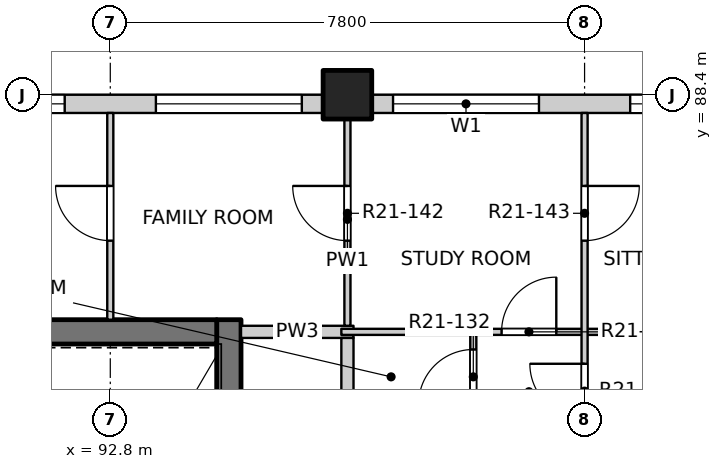
"""IFC4 building model, lengths in metres.
Left out: names, types, materials, properties, quantities, classifications, styles, units other than length and angle.
Written with IfcOpenShell. Run it as: python <this file> out.ifc"""

import sys

from ifc_helpers import new_model, si_unit, direction, frame, frame_2d, origin, origin_2d, place, context, subcontext, project, spatial, rectangle, extrude, element, fill, save


model = new_model("IFC4")
c1 = context("Model", 3, precision=1e-05, world=origin(), true_north=direction((0.0, 1.0)))
c2 = subcontext(c1, "Body", "Model", "MODEL_VIEW")
j1 = project(units=[si_unit("LENGTHUNIT", "METRE"), si_unit("PLANEANGLEUNIT", "RADIAN")], contexts=[c1])
p1 = place(None, origin())
s1 = spatial("IfcSite", under=j1, at=p1, CompositionType="ELEMENT")
p2 = place(p1, origin())
s2 = spatial("IfcBuilding", under=s1, at=p2, CompositionType="ELEMENT")
p3 = place(p2, frame((0.0, 0.0, 214.3)))
s3 = spatial("IfcBuildingStorey", under=s2, at=p3, CompositionType="ELEMENT", Elevation=214.3)
p4 = place(p3, frame((96.7, 88.4, -0.25), z_axis=(0.0, 0.0, 1.0), x_axis=(1.0, 0.0, 0.0)))
e1 = element("IfcColumn", 1, at=p4, inside=s3, PredefinedType="COLUMN", context=c2, shape_type="SweptSolid", body=[
    extrude(rectangle(XDim=0.8, YDim=0.8, at=origin_2d()), origin(), (0.0, 0.0, 1.0), 3.4),
])
p5 = place(p3, frame((94.75, 77.3, -0.25), z_axis=(0.0, 0.0, 1.0), x_axis=(0.0, 1.0, 0.0)))
e2 = element("IfcWall", 2, at=p5, inside=s3, PredefinedType="SOLIDWALL", context=c2, shape_type="SweptSolid", body=[
    extrude(rectangle(XDim=7.4, YDim=0.4, at=frame_2d((3.7, 0.0))), origin(), (0.0, 0.0, 1.0), 3.4),
])
p6 = place(p5, frame((0.3, 0.0, 0.25)))
e3 = element("IfcOpeningElement", 3, at=p6, cuts=e2, PredefinedType="OPENING", context=c2, shape_type="SweptSolid", body=[
    extrude(rectangle(XDim=1.2, YDim=2.1, at=frame_2d((0.6, 1.05))), frame((0.0, 0.21, 0.0), z_axis=(0.0, -1.0, 0.0), x_axis=(1.0, 0.0, 0.0)), (0.0, 0.0, 1.0), 0.42),
])
p7 = place(p3, frame((75.45, 84.5, -0.25), z_axis=(0.0, 0.0, 1.0), x_axis=(1.0, 0.0, 0.0)))
e4 = element("IfcWall", 4, at=p7, inside=s3, PredefinedType="SOLIDWALL", context=c2, shape_type="SweptSolid", body=[
    extrude(rectangle(XDim=19.1, YDim=0.4, at=frame_2d((9.55, 0.0))), origin(), (0.0, 0.0, 1.0), 3.4),
])
p8 = place(p3, frame((73.7, 88.25, 0.0), z_axis=(0.0, 0.0, 1.0), x_axis=(1.0, 0.0, 0.0)))
e5 = element("IfcWall", 5, at=p8, inside=s3, PredefinedType="SOLIDWALL", context=c2, shape_type="SweptSolid", body=[
    extrude(rectangle(XDim=22.6, YDim=0.3, at=frame_2d((11.3, 0.0))), origin(), (0.0, 0.0, 1.0), 2.7),
])
p9 = place(p8, frame((0.35, 0.0, 0.9)))
e6 = element("IfcOpeningElement", 6, at=p9, cuts=e5, PredefinedType="OPENING", context=c2, shape_type="SweptSolid", body=[
    extrude(rectangle(XDim=2.4, YDim=1.8, at=frame_2d((1.2, 0.9))), frame((0.0, 0.16, 0.0), z_axis=(0.0, -1.0, 0.0), x_axis=(1.0, 0.0, 0.0)), (0.0, 0.0, 1.0), 0.32),
])
p10 = place(p8, frame((4.25, 0.0, 0.9)))
e7 = element("IfcOpeningElement", 7, at=p10, cuts=e5, PredefinedType="OPENING", context=c2, shape_type="SweptSolid", body=[
    extrude(rectangle(XDim=2.4, YDim=1.8, at=frame_2d((1.2, 0.9))), frame((0.0, 0.16, 0.0), z_axis=(0.0, -1.0, 0.0), x_axis=(1.0, 0.0, 0.0)), (0.0, 0.0, 1.0), 0.32),
])
p11 = place(p8, frame((8.15, 0.0, 0.9)))
e8 = element("IfcOpeningElement", 8, at=p11, cuts=e5, PredefinedType="OPENING", context=c2, shape_type="SweptSolid", body=[
    extrude(rectangle(XDim=2.4, YDim=1.8, at=frame_2d((1.2, 0.9))), frame((0.0, 0.16, 0.0), z_axis=(0.0, -1.0, 0.0), x_axis=(1.0, 0.0, 0.0)), (0.0, 0.0, 1.0), 0.32),
])
p12 = place(p8, frame((12.05, 0.0, 0.9)))
e9 = element("IfcOpeningElement", 9, at=p12, cuts=e5, PredefinedType="OPENING", context=c2, shape_type="SweptSolid", body=[
    extrude(rectangle(XDim=2.4, YDim=1.8, at=frame_2d((1.2, 0.9))), frame((0.0, 0.16, 0.0), z_axis=(0.0, -1.0, 0.0), x_axis=(1.0, 0.0, 0.0)), (0.0, 0.0, 1.0), 0.32),
])
p13 = place(p8, frame((15.95, 0.0, 0.9)))
e10 = element("IfcOpeningElement", 10, at=p13, cuts=e5, PredefinedType="OPENING", context=c2, shape_type="SweptSolid", body=[
    extrude(rectangle(XDim=2.4, YDim=1.8, at=frame_2d((1.2, 0.9))), frame((0.0, 0.16, 0.0), z_axis=(0.0, -1.0, 0.0), x_axis=(1.0, 0.0, 0.0)), (0.0, 0.0, 1.0), 0.32),
])
p14 = place(p8, frame((19.85, 0.0, 0.9)))
e11 = element("IfcOpeningElement", 11, at=p14, cuts=e5, PredefinedType="OPENING", context=c2, shape_type="SweptSolid", body=[
    extrude(rectangle(XDim=2.4, YDim=1.8, at=frame_2d((1.2, 0.9))), frame((0.0, 0.16, 0.0), z_axis=(0.0, -1.0, 0.0), x_axis=(1.0, 0.0, 0.0)), (0.0, 0.0, 1.0), 0.32),
])
p15 = place(p3, frame((97.1, 88.25, 0.0), z_axis=(0.0, 0.0, 1.0), x_axis=(1.0, 0.0, 0.0)))
e12 = element("IfcWall", 12, at=p15, inside=s3, PredefinedType="SOLIDWALL", context=c2, shape_type="SweptSolid", body=[
    extrude(rectangle(XDim=7.4, YDim=0.3, at=frame_2d((3.7, 0.0))), origin(), (0.0, 0.0, 1.0), 2.7),
])
p16 = place(p15, frame((0.35, 0.0, 0.9)))
e13 = element("IfcOpeningElement", 13, at=p16, cuts=e12, PredefinedType="OPENING", context=c2, shape_type="SweptSolid", body=[
    extrude(rectangle(XDim=2.4, YDim=1.8, at=frame_2d((1.2, 0.9))), frame((0.0, 0.16, 0.0), z_axis=(0.0, -1.0, 0.0), x_axis=(1.0, 0.0, 0.0)), (0.0, 0.0, 1.0), 0.32),
])
p17 = place(p15, frame((4.25, 0.0, 0.9)))
e14 = element("IfcOpeningElement", 14, at=p17, cuts=e12, PredefinedType="OPENING", context=c2, shape_type="SweptSolid", body=[
    extrude(rectangle(XDim=2.4, YDim=1.8, at=frame_2d((1.2, 0.9))), frame((0.0, 0.16, 0.0), z_axis=(0.0, -1.0, 0.0), x_axis=(1.0, 0.0, 0.0)), (0.0, 0.0, 1.0), 0.32),
])
p18 = place(p3, frame((94.95, 84.5, 0.0), z_axis=(0.0, 0.0, 1.0), x_axis=(1.0, 0.0, 0.0)))
e15 = element("IfcWall", 15, at=p18, inside=s3, PredefinedType="PARTITIONING", context=c2, shape_type="SweptSolid", body=[
    extrude(rectangle(XDim=1.85, YDim=0.2, at=frame_2d((0.925, 0.0))), origin(), (0.0, 0.0, 1.0), 3.15),
])
p19 = place(p3, frame((96.6, 84.5, 0.0), z_axis=(0.0, 0.0, 1.0), x_axis=(1.0, 0.0, 0.0)))
e16 = element("IfcWall", 16, at=p19, inside=s3, PredefinedType="PARTITIONING", context=c2, shape_type="SweptSolid", body=[
    extrude(rectangle(XDim=11.5, YDim=0.1, at=frame_2d((5.75, 0.0))), origin(), (0.0, 0.0, 1.0), 3.15),
])
p20 = place(p19, frame((2.635, 0.0, 0.0)))
e17 = element("IfcOpeningElement", 17, at=p20, cuts=e16, PredefinedType="OPENING", context=c2, shape_type="SweptSolid", body=[
    extrude(rectangle(XDim=0.9, YDim=2.1, at=frame_2d((0.45, 1.05))), frame((0.0, 0.06, 0.0), z_axis=(0.0, -1.0, 0.0), x_axis=(1.0, 0.0, 0.0)), (0.0, 0.0, 1.0), 0.12),
])
p21 = place(p3, frame((92.8, 84.7, 0.0), z_axis=(0.0, 0.0, 1.0), x_axis=(0.0, 1.0, 0.0)))
e18 = element("IfcWall", 18, at=p21, inside=s3, PredefinedType="PARTITIONING", context=c2, shape_type="SweptSolid", body=[
    extrude(rectangle(XDim=3.4, YDim=0.1, at=frame_2d((1.7, 0.0))), origin(), (0.0, 0.0, 1.0), 3.15),
])
p22 = place(p21, frame((1.3, 0.0, 0.0)))
e19 = element("IfcOpeningElement", 19, at=p22, cuts=e18, PredefinedType="OPENING", context=c2, shape_type="SweptSolid", body=[
    extrude(rectangle(XDim=0.9, YDim=2.1, at=frame_2d((0.45, 1.05))), frame((0.0, 0.06, 0.0), z_axis=(0.0, -1.0, 0.0), x_axis=(1.0, 0.0, 0.0)), (0.0, 0.0, 1.0), 0.12),
])
p23 = place(p3, frame((96.7, 49.5, 0.0), z_axis=(0.0, 0.0, 1.0), x_axis=(0.0, 1.0, 0.0)))
e20 = element("IfcWall", 20, at=p23, inside=s3, PredefinedType="PARTITIONING", context=c2, shape_type="SweptSolid", body=[
    extrude(rectangle(XDim=34.9, YDim=0.2, at=frame_2d((17.45, 0.0))), origin(), (0.0, 0.0, 1.0), 3.15),
])
p24 = place(p23, frame((3.275, 0.0, 0.0)))
e21 = element("IfcOpeningElement", 21, at=p24, cuts=e20, PredefinedType="OPENING", context=c2, shape_type="SweptSolid", body=[
    extrude(rectangle(XDim=1.0, YDim=2.1, at=frame_2d((0.5, 1.05))), frame((0.0, 0.11, 0.0), z_axis=(0.0, -1.0, 0.0), x_axis=(1.0, 0.0, 0.0)), (0.0, 0.0, 1.0), 0.22),
])
p25 = place(p23, frame((10.825, 0.0, 0.0)))
e22 = element("IfcOpeningElement", 22, at=p25, cuts=e20, PredefinedType="OPENING", context=c2, shape_type="SweptSolid", body=[
    extrude(rectangle(XDim=1.0, YDim=2.1, at=frame_2d((0.5, 1.05))), frame((0.0, 0.11, 0.0), z_axis=(0.0, -1.0, 0.0), x_axis=(1.0, 0.0, 0.0)), (0.0, 0.0, 1.0), 0.22),
])
p26 = place(p23, frame((21.575, 0.0, 0.0)))
e23 = element("IfcOpeningElement", 23, at=p26, cuts=e20, PredefinedType="OPENING", context=c2, shape_type="SweptSolid", body=[
    extrude(rectangle(XDim=1.0, YDim=2.1, at=frame_2d((0.5, 1.05))), frame((0.0, 0.11, 0.0), z_axis=(0.0, -1.0, 0.0), x_axis=(1.0, 0.0, 0.0)), (0.0, 0.0, 1.0), 0.22),
])
p27 = place(p23, frame((30.575, 0.0, 0.0)))
e24 = element("IfcOpeningElement", 24, at=p27, cuts=e20, PredefinedType="OPENING", context=c2, shape_type="SweptSolid", body=[
    extrude(rectangle(XDim=1.0, YDim=2.1, at=frame_2d((0.5, 1.05))), frame((0.0, 0.11, 0.0), z_axis=(0.0, -1.0, 0.0), x_axis=(1.0, 0.0, 0.0)), (0.0, 0.0, 1.0), 0.22),
])
p28 = place(p3, frame((96.7, 84.6, 0.0), z_axis=(0.0, 0.0, 1.0), x_axis=(0.0, 1.0, 0.0)))
e25 = element("IfcWall", 25, at=p28, inside=s3, PredefinedType="PARTITIONING", context=c2, shape_type="SweptSolid", body=[
    extrude(rectangle(XDim=3.5, YDim=0.1, at=frame_2d((1.75, 0.0))), origin(), (0.0, 0.0, 1.0), 3.15),
])
p29 = place(p28, frame((1.4, 0.0, 0.0)))
e26 = element("IfcOpeningElement", 26, at=p29, cuts=e25, PredefinedType="OPENING", context=c2, shape_type="SweptSolid", body=[
    extrude(rectangle(XDim=0.9, YDim=2.1, at=frame_2d((0.45, 1.05))), frame((0.0, 0.06, 0.0), z_axis=(0.0, -1.0, 0.0), x_axis=(1.0, 0.0, 0.0)), (0.0, 0.0, 1.0), 0.12),
])
p30 = place(p3, frame((98.77, 79.95, 0.0), z_axis=(0.0, 0.0, 1.0), x_axis=(0.0, 1.0, 0.0)))
e27 = element("IfcWall", 27, at=p30, inside=s3, PredefinedType="PARTITIONING", context=c2, shape_type="SweptSolid", body=[
    extrude(rectangle(XDim=4.5, YDim=0.1, at=frame_2d((2.25, 0.0))), origin(), (0.0, 0.0, 1.0), 3.15),
])
p31 = place(p30, frame((0.435, 0.0, 0.0)))
e28 = element("IfcOpeningElement", 28, at=p31, cuts=e27, PredefinedType="OPENING", context=c2, shape_type="SweptSolid", body=[
    extrude(rectangle(XDim=0.9, YDim=2.1, at=frame_2d((0.45, 1.05))), frame((0.0, 0.06, 0.0), z_axis=(0.0, -1.0, 0.0), x_axis=(1.0, 0.0, 0.0)), (0.0, 0.0, 1.0), 0.12),
])
p32 = place(p30, frame((2.045, 0.0, 0.0)))
e29 = element("IfcOpeningElement", 29, at=p32, cuts=e27, PredefinedType="OPENING", context=c2, shape_type="SweptSolid", body=[
    extrude(rectangle(XDim=0.8, YDim=2.1, at=frame_2d((0.4, 1.05))), frame((0.0, 0.06, 0.0), z_axis=(0.0, -1.0, 0.0), x_axis=(1.0, 0.0, 0.0)), (0.0, 0.0, 1.0), 0.12),
])
p33 = place(p30, frame((3.36, 0.0, 0.0)))
e30 = element("IfcOpeningElement", 30, at=p33, cuts=e27, PredefinedType="OPENING", context=c2, shape_type="SweptSolid", body=[
    extrude(rectangle(XDim=0.9, YDim=2.1, at=frame_2d((0.45, 1.05))), frame((0.0, 0.06, 0.0), z_axis=(0.0, -1.0, 0.0), x_axis=(1.0, 0.0, 0.0)), (0.0, 0.0, 1.0), 0.12),
])
p34 = place(p3, frame((100.6, 41.9, 0.0), z_axis=(0.0, 0.0, 1.0), x_axis=(0.0, 1.0, 0.0)))
e31 = element("IfcWall", 31, at=p34, inside=s3, PredefinedType="PARTITIONING", context=c2, shape_type="SweptSolid", body=[
    extrude(rectangle(XDim=46.2, YDim=0.1, at=frame_2d((23.1, 0.0))), origin(), (0.0, 0.0, 1.0), 3.15),
])
p35 = place(p34, frame((1.2, 0.0, 0.0)))
e32 = element("IfcOpeningElement", 32, at=p35, cuts=e31, PredefinedType="OPENING", context=c2, shape_type="SweptSolid", body=[
    extrude(rectangle(XDim=0.9, YDim=2.1, at=frame_2d((0.45, 1.05))), frame((0.0, 0.06, 0.0), z_axis=(0.0, -1.0, 0.0), x_axis=(1.0, 0.0, 0.0)), (0.0, 0.0, 1.0), 0.12),
])
p36 = place(p34, frame((6.025, 0.0, 0.0)))
e33 = element("IfcOpeningElement", 33, at=p36, cuts=e31, PredefinedType="OPENING", context=c2, shape_type="SweptSolid", body=[
    extrude(rectangle(XDim=0.9, YDim=2.1, at=frame_2d((0.45, 1.05))), frame((0.0, 0.06, 0.0), z_axis=(0.0, -1.0, 0.0), x_axis=(1.0, 0.0, 0.0)), (0.0, 0.0, 1.0), 0.12),
])
p37 = place(p34, frame((9.0, 0.0, 0.0)))
e34 = element("IfcOpeningElement", 34, at=p37, cuts=e31, PredefinedType="OPENING", context=c2, shape_type="SweptSolid", body=[
    extrude(rectangle(XDim=0.9, YDim=2.1, at=frame_2d((0.45, 1.05))), frame((0.0, 0.06, 0.0), z_axis=(0.0, -1.0, 0.0), x_axis=(1.0, 0.0, 0.0)), (0.0, 0.0, 1.0), 0.12),
])
p38 = place(p34, frame((13.85, 0.0, 0.0)))
e35 = element("IfcOpeningElement", 35, at=p38, cuts=e31, PredefinedType="OPENING", context=c2, shape_type="SweptSolid", body=[
    extrude(rectangle(XDim=0.9, YDim=2.1, at=frame_2d((0.45, 1.05))), frame((0.0, 0.06, 0.0), z_axis=(0.0, -1.0, 0.0), x_axis=(1.0, 0.0, 0.0)), (0.0, 0.0, 1.0), 0.12),
])
p39 = place(p34, frame((16.8, 0.0, 0.0)))
e36 = element("IfcOpeningElement", 36, at=p39, cuts=e31, PredefinedType="OPENING", context=c2, shape_type="SweptSolid", body=[
    extrude(rectangle(XDim=0.9, YDim=2.1, at=frame_2d((0.45, 1.05))), frame((0.0, 0.06, 0.0), z_axis=(0.0, -1.0, 0.0), x_axis=(1.0, 0.0, 0.0)), (0.0, 0.0, 1.0), 0.12),
])
p40 = place(p34, frame((21.625, 0.0, 0.0)))
e37 = element("IfcOpeningElement", 37, at=p40, cuts=e31, PredefinedType="OPENING", context=c2, shape_type="SweptSolid", body=[
    extrude(rectangle(XDim=0.9, YDim=2.1, at=frame_2d((0.45, 1.05))), frame((0.0, 0.06, 0.0), z_axis=(0.0, -1.0, 0.0), x_axis=(1.0, 0.0, 0.0)), (0.0, 0.0, 1.0), 0.12),
])
p41 = place(p34, frame((24.6, 0.0, 0.0)))
e38 = element("IfcOpeningElement", 38, at=p41, cuts=e31, PredefinedType="OPENING", context=c2, shape_type="SweptSolid", body=[
    extrude(rectangle(XDim=0.9, YDim=2.1, at=frame_2d((0.45, 1.05))), frame((0.0, 0.06, 0.0), z_axis=(0.0, -1.0, 0.0), x_axis=(1.0, 0.0, 0.0)), (0.0, 0.0, 1.0), 0.12),
])
p42 = place(p34, frame((29.425, 0.0, 0.0)))
e39 = element("IfcOpeningElement", 39, at=p42, cuts=e31, PredefinedType="OPENING", context=c2, shape_type="SweptSolid", body=[
    extrude(rectangle(XDim=0.9, YDim=2.1, at=frame_2d((0.45, 1.05))), frame((0.0, 0.06, 0.0), z_axis=(0.0, -1.0, 0.0), x_axis=(1.0, 0.0, 0.0)), (0.0, 0.0, 1.0), 0.12),
])
p43 = place(p34, frame((33.375, 0.0, 0.0)))
e40 = element("IfcOpeningElement", 40, at=p43, cuts=e31, PredefinedType="OPENING", context=c2, shape_type="SweptSolid", body=[
    extrude(rectangle(XDim=0.9, YDim=2.1, at=frame_2d((0.45, 1.05))), frame((0.0, 0.06, 0.0), z_axis=(0.0, -1.0, 0.0), x_axis=(1.0, 0.0, 0.0)), (0.0, 0.0, 1.0), 0.12),
])
p44 = place(p34, frame((36.3, 0.0, 0.0)))
e41 = element("IfcOpeningElement", 41, at=p44, cuts=e31, PredefinedType="OPENING", context=c2, shape_type="SweptSolid", body=[
    extrude(rectangle(XDim=0.9, YDim=2.1, at=frame_2d((0.45, 1.05))), frame((0.0, 0.06, 0.0), z_axis=(0.0, -1.0, 0.0), x_axis=(1.0, 0.0, 0.0)), (0.0, 0.0, 1.0), 0.12),
])
p45 = place(p34, frame((41.175, 0.0, 0.0)))
e42 = element("IfcOpeningElement", 42, at=p45, cuts=e31, PredefinedType="OPENING", context=c2, shape_type="SweptSolid", body=[
    extrude(rectangle(XDim=0.9, YDim=2.1, at=frame_2d((0.45, 1.05))), frame((0.0, 0.06, 0.0), z_axis=(0.0, -1.0, 0.0), x_axis=(1.0, 0.0, 0.0)), (0.0, 0.0, 1.0), 0.12),
])
p46 = place(p34, frame((44.1, 0.0, 0.0)))
e43 = element("IfcOpeningElement", 43, at=p46, cuts=e31, PredefinedType="OPENING", context=c2, shape_type="SweptSolid", body=[
    extrude(rectangle(XDim=0.9, YDim=2.1, at=frame_2d((0.45, 1.05))), frame((0.0, 0.06, 0.0), z_axis=(0.0, -1.0, 0.0), x_axis=(1.0, 0.0, 0.0)), (0.0, 0.0, 1.0), 0.12),
])
p47 = place(p13, origin())
e44 = element("IfcWindow", 44, at=p47, inside=s3, PartitioningType="DOUBLE_PANEL_VERTICAL", PredefinedType="WINDOW", context=c2, shape_type="SweptSolid", body=[
    extrude(rectangle(XDim=2.4, YDim=1.8, at=frame_2d((1.2, 0.9))), frame((0.0, 0.03, 0.0), z_axis=(0.0, -1.0, 0.0), x_axis=(1.0, 0.0, 0.0)), (0.0, 0.0, 1.0), 0.06),
])
fill(e10, e44)
p48 = place(p14, origin())
e45 = element("IfcWindow", 45, at=p48, inside=s3, PartitioningType="DOUBLE_PANEL_VERTICAL", PredefinedType="WINDOW", context=c2, shape_type="SweptSolid", body=[
    extrude(rectangle(XDim=2.4, YDim=1.8, at=frame_2d((1.2, 0.9))), frame((0.0, 0.03, 0.0), z_axis=(0.0, -1.0, 0.0), x_axis=(1.0, 0.0, 0.0)), (0.0, 0.0, 1.0), 0.06),
])
fill(e11, e45)
p49 = place(p16, origin())
e46 = element("IfcWindow", 46, at=p49, inside=s3, PartitioningType="DOUBLE_PANEL_VERTICAL", PredefinedType="WINDOW", context=c2, shape_type="SweptSolid", body=[
    extrude(rectangle(XDim=2.4, YDim=1.8, at=frame_2d((1.2, 0.9))), frame((0.0, 0.03, 0.0), z_axis=(0.0, -1.0, 0.0), x_axis=(1.0, 0.0, 0.0)), (0.0, 0.0, 1.0), 0.06),
])
fill(e13, e46)
p50 = place(p17, origin())
e47 = element("IfcWindow", 47, at=p50, inside=s3, PartitioningType="DOUBLE_PANEL_VERTICAL", PredefinedType="WINDOW", context=c2, shape_type="SweptSolid", body=[
    extrude(rectangle(XDim=2.4, YDim=1.8, at=frame_2d((1.2, 0.9))), frame((0.0, 0.03, 0.0), z_axis=(0.0, -1.0, 0.0), x_axis=(1.0, 0.0, 0.0)), (0.0, 0.0, 1.0), 0.06),
])
fill(e14, e47)
p51 = place(p45, origin())
e48 = element("IfcDoor", 48, at=p51, inside=s3, OperationType="SINGLE_SWING_RIGHT", PredefinedType="DOOR", context=c2, shape_type="SweptSolid", body=[
    extrude(rectangle(XDim=0.9, YDim=2.1, at=frame_2d((0.45, 1.05))), frame((0.0, 0.025, 0.0), z_axis=(0.0, -1.0, 0.0), x_axis=(1.0, 0.0, 0.0)), (0.0, 0.0, 1.0), 0.05),
])
fill(e42, e48)
p52 = place(p33, origin())
e49 = element("IfcDoor", 49, at=p52, inside=s3, OperationType="SINGLE_SWING_LEFT", PredefinedType="DOOR", context=c2, shape_type="SweptSolid", body=[
    extrude(rectangle(XDim=0.9, YDim=2.1, at=frame_2d((0.45, 1.05))), frame((0.0, 0.025, 0.0), z_axis=(0.0, -1.0, 0.0), x_axis=(1.0, 0.0, 0.0)), (0.0, 0.0, 1.0), 0.05),
])
fill(e30, e49)
p53 = place(p20, origin())
e50 = element("IfcDoor", 50, at=p53, inside=s3, OperationType="SINGLE_SWING_RIGHT", PredefinedType="DOOR", context=c2, shape_type="SweptSolid", body=[
    extrude(rectangle(XDim=0.9, YDim=2.1, at=frame_2d((0.45, 1.05))), frame((0.0, 0.025, 0.0), z_axis=(0.0, -1.0, 0.0), x_axis=(1.0, 0.0, 0.0)), (0.0, 0.0, 1.0), 0.05),
])
fill(e17, e50)
p54 = place(p22, origin())
e51 = element("IfcDoor", 51, at=p54, inside=s3, OperationType="SINGLE_SWING_RIGHT", PredefinedType="DOOR", context=c2, shape_type="SweptSolid", body=[
    extrude(rectangle(XDim=0.9, YDim=2.1, at=frame_2d((0.45, 1.05))), frame((0.0, 0.025, 0.0), z_axis=(0.0, -1.0, 0.0), x_axis=(1.0, 0.0, 0.0)), (0.0, 0.0, 1.0), 0.05),
])
fill(e19, e51)
p55 = place(p29, origin())
e52 = element("IfcDoor", 52, at=p55, inside=s3, OperationType="SINGLE_SWING_RIGHT", PredefinedType="DOOR", context=c2, shape_type="SweptSolid", body=[
    extrude(rectangle(XDim=0.9, YDim=2.1, at=frame_2d((0.45, 1.05))), frame((0.0, 0.025, 0.0), z_axis=(0.0, -1.0, 0.0), x_axis=(1.0, 0.0, 0.0)), (0.0, 0.0, 1.0), 0.05),
])
fill(e26, e52)
p56 = place(p46, origin())
e53 = element("IfcDoor", 53, at=p56, inside=s3, OperationType="SINGLE_SWING_LEFT", PredefinedType="DOOR", context=c2, shape_type="SweptSolid", body=[
    extrude(rectangle(XDim=0.9, YDim=2.1, at=frame_2d((0.45, 1.05))), frame((0.0, 0.025, 0.0), z_axis=(0.0, -1.0, 0.0), x_axis=(1.0, 0.0, 0.0)), (0.0, 0.0, 1.0), 0.05),
])
fill(e43, e53)
save(model, sys.argv[1])
